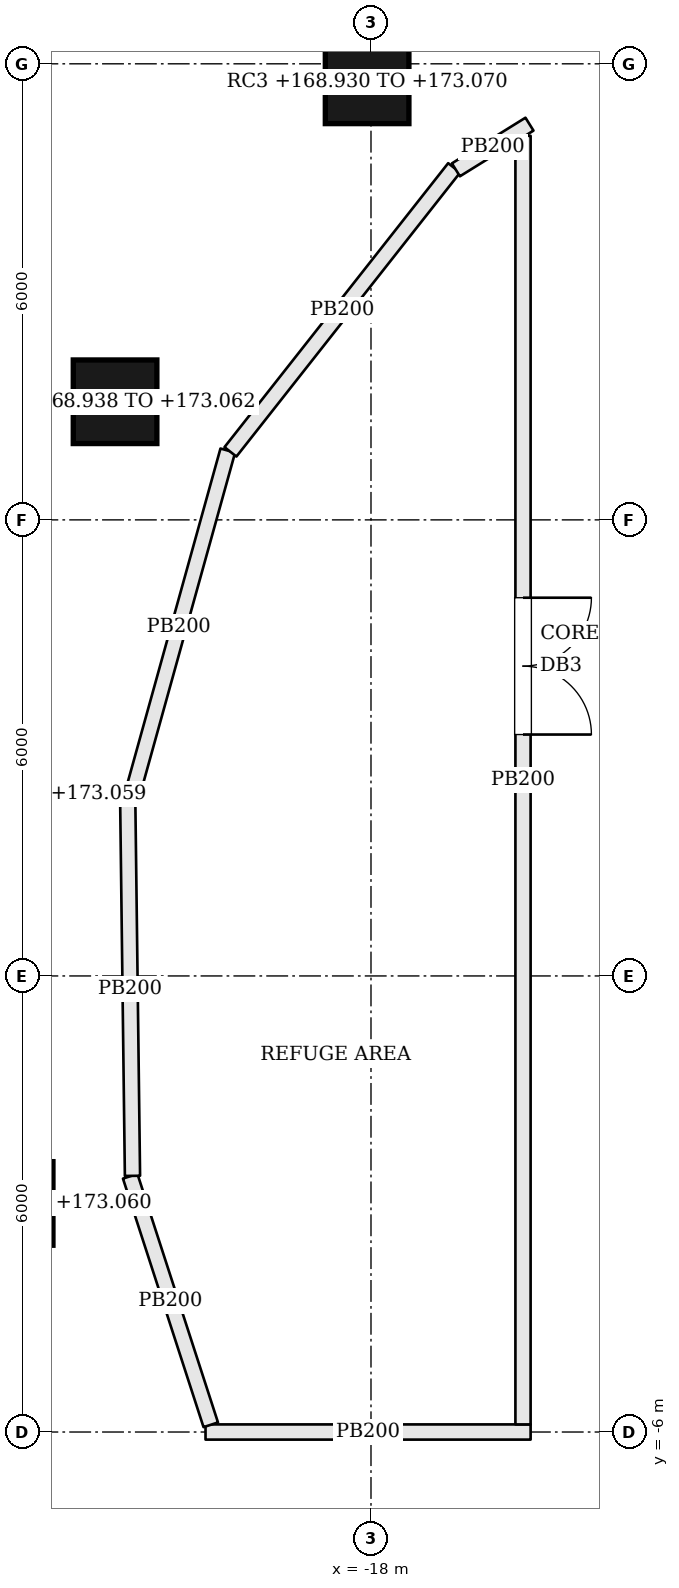
"""IFC4 building model, lengths in metres.
Left out: names, types, materials, properties, quantities, classifications, styles, units other than length and angle.
Written with IfcOpenShell. Run it as: python <this file> out.ifc"""

import sys

from ifc_helpers import new_model, si_unit, direction, frame, frame_2d, origin, origin_2d, place, context, subcontext, project, spatial, rectangle, extrude, element, fill, save


model = new_model("IFC4")
c1 = context("Model", 3, precision=1e-05, world=origin(), true_north=direction((0.0, 1.0)))
c2 = subcontext(c1, "Body", "Model", "MODEL_VIEW")
j1 = project(units=[si_unit("LENGTHUNIT", "METRE"), si_unit("PLANEANGLEUNIT", "RADIAN")], contexts=[c1])
p1 = place(None, origin())
s1 = spatial("IfcSite", under=j1, at=p1, CompositionType="ELEMENT")
p2 = place(p1, origin())
s2 = spatial("IfcBuilding", under=s1, at=p2, CompositionType="ELEMENT")
p3 = place(p2, frame((0.0, 0.0, 169.5)))
s3 = spatial("IfcBuildingStorey", under=s2, at=p3, CompositionType="ELEMENT", Elevation=169.5)
p4 = place(p3, frame((-18.051, 11.763, -0.57), z_axis=(-0.339960985599, 0.226443297406, 0.912770486667), x_axis=(-0.554365652735, -0.832273226211, 0.0)))
e1 = element("IfcColumn", 1, at=p4, inside=s3, PredefinedType="COLUMN", context=c2, shape_type="SweptSolid", body=[
    extrude(rectangle(XDim=1.1, YDim=1.1, at=origin_2d()), origin(), (0.0, 0.0, 1.0), 4.536),
])
p5 = place(p3, frame((-21.367, 7.554, -0.562), z_axis=(-0.399191098606, 0.144034709541, 0.905483555478), x_axis=(-0.339399243932, -0.940642415171, 0.0)))
e2 = element("IfcColumn", 2, at=p5, inside=s3, PredefinedType="COLUMN", context=c2, shape_type="SweptSolid", body=[
    extrude(rectangle(XDim=1.1, YDim=1.1, at=origin_2d()), origin(), (0.0, 0.0, 1.0), 4.554),
])
p6 = place(p3, frame((-22.734, -2.993, -0.56), z_axis=(-0.424443684134, -0.055960591713, 0.903723393066), x_axis=(0.130713362485, -0.991420201967, 0.0)))
e3 = element("IfcColumn", 3, at=p6, inside=s3, PredefinedType="COLUMN", context=c2, shape_type="SweptSolid", body=[
    extrude(rectangle(XDim=1.1, YDim=1.1, at=origin_2d()), origin(), (0.0, 0.0, 1.0), 4.559),
])
p7 = place(p3, frame((-21.094, 15.288, 0.0), z_axis=(0.0, 0.0, 1.0), x_axis=(-0.69406513137, -0.719912212298, 0.0)))
e4 = element("IfcWall", 4, at=p7, inside=s3, PredefinedType="SOLIDWALL", context=c2, shape_type="SweptSolid", body=[
    extrude(rectangle(XDim=4.298, YDim=0.45, at=frame_2d((2.149, 0.0))), origin(), (0.0, 0.0, 1.0), 4.3),
])
p8 = place(p7, frame((1.099, 0.0, 1.2)))
e5 = element("IfcOpeningElement", 5, at=p8, cuts=e4, PredefinedType="OPENING", context=c2, shape_type="SweptSolid", body=[
    extrude(rectangle(XDim=2.1, YDim=1.8, at=frame_2d((1.05, 0.9))), frame((0.0, 0.235, 0.0), z_axis=(0.0, -1.0, 0.0), x_axis=(1.0, 0.0, 0.0)), (0.0, 0.0, 1.0), 0.47),
])
p9 = place(p3, frame((-15.9, -6.0, 0.0), z_axis=(0.0, 0.0, 1.0), x_axis=(-1.0, 0.0, 0.0)))
e6 = element("IfcWall", 6, at=p9, inside=s3, PredefinedType="PARTITIONING", context=c2, shape_type="SweptSolid", body=[
    extrude(rectangle(XDim=4.277, YDim=0.2, at=frame_2d((2.139, 0.0))), origin(), (0.0, 0.0, 1.0), 4.3),
])
p10 = place(p3, frame((-20.108, -5.905, 0.0), z_axis=(0.0, 0.0, 1.0), x_axis=(-0.308376170844, 0.951264493848, 0.0)))
e7 = element("IfcWall", 7, at=p10, inside=s3, PredefinedType="PARTITIONING", context=c2, shape_type="SweptSolid", body=[
    extrude(rectangle(XDim=3.438, YDim=0.2, at=frame_2d((1.719, 0.0))), origin(), (0.0, 0.0, 1.0), 4.3),
])
p11 = place(p3, frame((-21.138, -2.63, 0.0), z_axis=(0.0, 0.0, 1.0), x_axis=(-0.012626385888, 0.999920284012, 0.0)))
e8 = element("IfcWall", 8, at=p11, inside=s3, PredefinedType="PARTITIONING", context=c2, shape_type="SweptSolid", body=[
    extrude(rectangle(XDim=4.911, YDim=0.2, at=frame_2d((2.456, 0.0))), origin(), (0.0, 0.0, 1.0), 4.3),
])
p12 = place(p3, frame((-21.172, 2.277, 0.0), z_axis=(0.0, 0.0, 1.0), x_axis=(0.267756413289, 0.963486638798, 0.0)))
e9 = element("IfcWall", 9, at=p12, inside=s3, PredefinedType="PARTITIONING", context=c2, shape_type="SweptSolid", body=[
    extrude(rectangle(XDim=4.811, YDim=0.2, at=frame_2d((2.405, 0.0))), origin(), (0.0, 0.0, 1.0), 4.3),
])
p13 = place(p3, frame((-19.849, 6.895, 0.0), z_axis=(0.0, 0.0, 1.0), x_axis=(0.618811760178, 0.785539308669, 0.0)))
e10 = element("IfcWall", 10, at=p13, inside=s3, PredefinedType="PARTITIONING", context=c2, shape_type="SweptSolid", body=[
    extrude(rectangle(XDim=4.756, YDim=0.2, at=frame_2d((2.378, 0.0))), origin(), (0.0, 0.0, 1.0), 4.3),
])
p14 = place(p3, frame((-16.883, 10.605, 0.0), z_axis=(0.0, 0.0, 1.0), x_axis=(0.84954745962, 0.527512193085, 0.0)))
e11 = element("IfcWall", 11, at=p14, inside=s3, PredefinedType="PARTITIONING", context=c2, shape_type="SweptSolid", body=[
    extrude(rectangle(XDim=1.139, YDim=0.2, at=frame_2d((0.57, 0.0))), origin(), (0.0, 0.0, 1.0), 4.3),
])
p15 = place(p3, frame((-16.0, 11.053, 0.0), z_axis=(0.0, 0.0, 1.0), x_axis=(0.0, -1.0, 0.0)))
e12 = element("IfcWall", 12, at=p15, inside=s3, PredefinedType="PARTITIONING", context=c2, shape_type="SweptSolid", body=[
    extrude(rectangle(XDim=16.953, YDim=0.2, at=frame_2d((8.477, 0.0))), origin(), (0.0, 0.0, 1.0), 4.3),
])
p16 = place(p15, frame((6.077, 0.0, 0.0)))
e13 = element("IfcOpeningElement", 13, at=p16, cuts=e12, PredefinedType="OPENING", context=c2, shape_type="SweptSolid", body=[
    extrude(rectangle(XDim=1.8, YDim=2.1, at=frame_2d((0.9, 1.05))), frame((0.0, 0.11, 0.0), z_axis=(0.0, -1.0, 0.0), x_axis=(1.0, 0.0, 0.0)), (0.0, 0.0, 1.0), 0.22),
])
p17 = place(p16, origin())
e14 = element("IfcDoor", 14, at=p17, inside=s3, OperationType="DOUBLE_DOOR_SINGLE_SWING", PredefinedType="DOOR", context=c2, shape_type="SweptSolid", body=[
    extrude(rectangle(XDim=1.8, YDim=2.1, at=frame_2d((0.9, 1.05))), frame((0.0, 0.025, 0.0), z_axis=(0.0, -1.0, 0.0), x_axis=(1.0, 0.0, 0.0)), (0.0, 0.0, 1.0), 0.05),
])
fill(e13, e14)
save(model, sys.argv[1])
